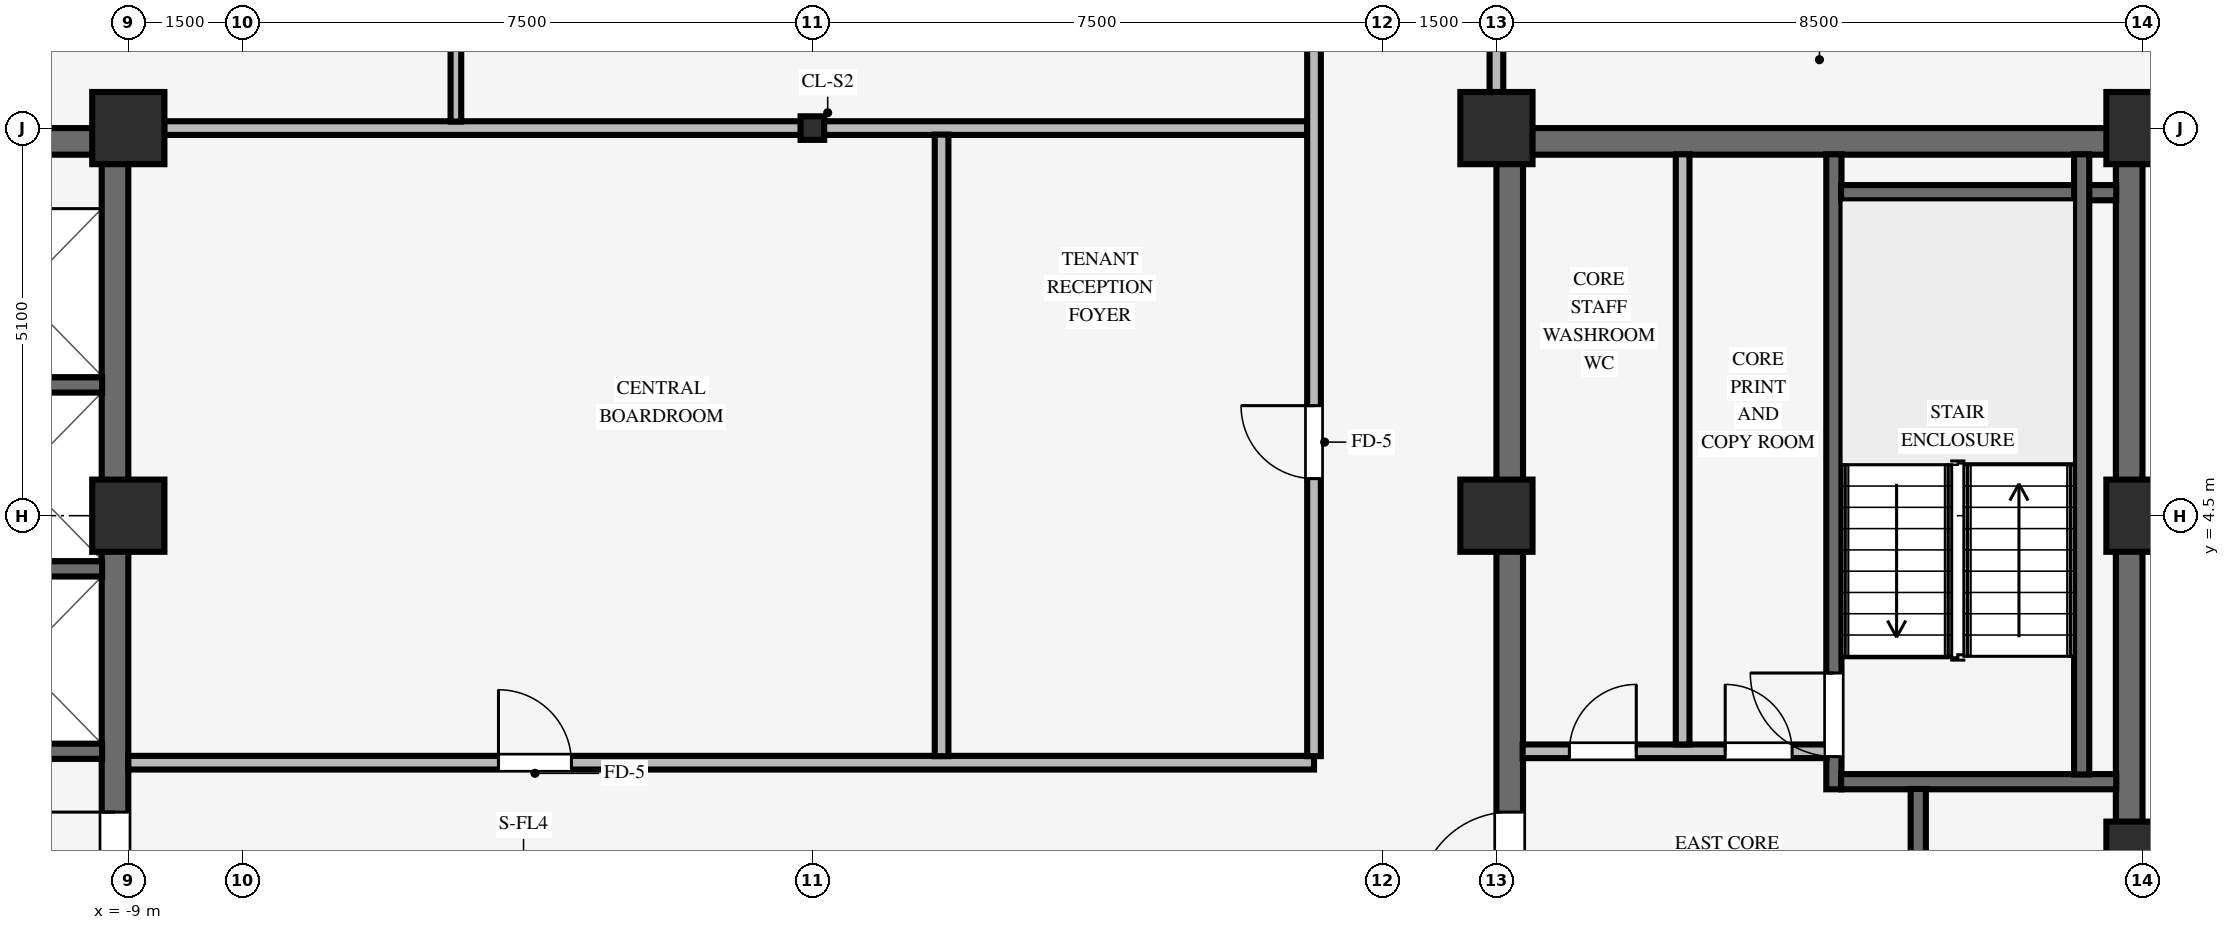
"""IFC4 building model, lengths in metres.
Left out: names, types, materials, properties, quantities, classifications, styles, units other than length and angle.
Written with IfcOpenShell. Run it as: python <this file> out.ifc"""

import sys

from ifc_helpers import new_model, si_unit, direction, frame, frame_2d, origin, origin_2d, place, context, subcontext, project, spatial, rectangle, i_section, extrude, source, transform, mapped, element, fill, save


model = new_model("IFC4")
c1 = context("Model", 3, precision=1e-05, world=origin(), true_north=direction((0.0, 1.0)))
c2 = subcontext(c1, "Body", "Model", "MODEL_VIEW")
j1 = project(units=[si_unit("LENGTHUNIT", "METRE"), si_unit("PLANEANGLEUNIT", "RADIAN")], contexts=[c1])
p1 = place(None, origin())
s1 = spatial("IfcSite", under=j1, at=p1, CompositionType="ELEMENT")
p2 = place(p1, origin())
s2 = spatial("IfcBuilding", under=s1, at=p2, CompositionType="ELEMENT")
p3 = place(p2, frame((0.0, 0.0, 212.8)))
s3 = spatial("IfcBuildingStorey", under=s2, at=p3, CompositionType="ELEMENT", Elevation=212.8)
p4 = place(p3, frame((-17.5, 9.425, 0.0), z_axis=(0.0, 0.0, 1.0), x_axis=(1.0, 0.0, 0.0)))
e1 = element("IfcWall", 1, at=p4, inside=s3, PredefinedType="SHEAR", context=c2, shape_type="SweptSolid", body=[
    extrude(rectangle(XDim=8.5, YDim=0.35, at=frame_2d((4.25, 0.0))), origin(), (0.0, 0.0, 1.0), 3.37),
])
p5 = place(p3, frame((-9.175, -9.255, 0.0), z_axis=(0.0, 0.0, 1.0), x_axis=(0.0, 1.0, 0.0)))
e2 = element("IfcWall", 2, at=p5, inside=s3, PredefinedType="SHEAR", context=c2, shape_type="SweptSolid", body=[
    extrude(rectangle(XDim=18.51, YDim=0.35, at=frame_2d((9.255, 0.0))), origin(), (0.0, 0.0, 1.0), 3.37),
])
p6 = place(p5, frame((8.655, 0.0, 0.0)))
e3 = element("IfcOpeningElement", 3, at=p6, cuts=e2, PredefinedType="OPENING", context=c2, shape_type="SweptSolid", body=[
    extrude(rectangle(XDim=1.2, YDim=2.15, at=frame_2d((0.6, 1.075))), frame((0.0, 0.185, 0.0), z_axis=(0.0, -1.0, 0.0), x_axis=(1.0, 0.0, 0.0)), (0.0, 0.0, 1.0), 0.37),
])
p7 = place(p3, frame((9.0, 9.425, 0.0), z_axis=(0.0, 0.0, 1.0), x_axis=(1.0, 0.0, 0.0)))
e4 = element("IfcWall", 4, at=p7, inside=s3, PredefinedType="SHEAR", context=c2, shape_type="SweptSolid", body=[
    extrude(rectangle(XDim=8.5, YDim=0.35, at=frame_2d((4.25, 0.0))), origin(), (0.0, 0.0, 1.0), 3.37),
])
p8 = place(p3, frame((9.175, -9.255, 0.0), z_axis=(0.0, 0.0, 1.0), x_axis=(0.0, 1.0, 0.0)))
e5 = element("IfcWall", 5, at=p8, inside=s3, PredefinedType="SHEAR", context=c2, shape_type="SweptSolid", body=[
    extrude(rectangle(XDim=18.51, YDim=0.35, at=frame_2d((9.255, 0.0))), origin(), (0.0, 0.0, 1.0), 3.37),
])
p9 = place(p8, frame((8.655, 0.0, 0.0)))
e6 = element("IfcOpeningElement", 6, at=p9, cuts=e5, PredefinedType="OPENING", context=c2, shape_type="SweptSolid", body=[
    extrude(rectangle(XDim=1.2, YDim=2.15, at=frame_2d((0.6, 1.075))), frame((0.0, 0.185, 0.0), z_axis=(0.0, -1.0, 0.0), x_axis=(1.0, 0.0, 0.0)), (0.0, 0.0, 1.0), 0.37),
])
p10 = place(p3, frame((17.325, -9.255, 0.0), z_axis=(0.0, 0.0, 1.0), x_axis=(0.0, 1.0, 0.0)))
e7 = element("IfcWall", 7, at=p10, inside=s3, PredefinedType="SHEAR", context=c2, shape_type="SweptSolid", body=[
    extrude(rectangle(XDim=18.51, YDim=0.35, at=frame_2d((9.255, 0.0))), origin(), (0.0, 0.0, 1.0), 3.37),
])
for number, where, z_axis, x_axis in (
    (8, (-9.0, 4.5, 0.0), (0.0, 0.0, 1.0), (1.0, 0.0, 0.0)),
    (9, (-9.0, 9.6, 0.0), (0.0, 0.0, 1.0), (1.0, 0.0, 0.0)),
    (10, (9.0, 4.5, 0.0), (0.0, 0.0, 1.0), (1.0, 0.0, 0.0)),
    (11, (9.0, 9.6, 0.0), (0.0, 0.0, 1.0), (1.0, 0.0, 0.0)),
    (12, (17.5, 4.5, 0.0), (0.0, 0.0, 1.0), (1.0, 0.0, 0.0)),
    (13, (17.5, 9.6, 0.0), (0.0, 0.0, 1.0), (1.0, 0.0, 0.0)),
    (14, (17.5, 0.0, 0.0), (0.0, 0.0, 1.0), (1.0, 0.0, 0.0)),
):
    element("IfcColumn", number, at=place(p3, frame(where, z_axis=z_axis, x_axis=x_axis)), inside=s3, PredefinedType="COLUMN", context=c2, shape_type="SweptSolid", body=[
        extrude(rectangle(XDim=0.95, YDim=0.95, at=origin_2d()), origin(), (0.0, 0.0, 1.0), 3.37),
    ])
p11 = place(p3, frame((0.0, 9.6, 0.0), z_axis=(0.0, 0.0, 1.0), x_axis=(1.0, 0.0, 0.0)))
e15 = element("IfcColumn", 15, at=p11, inside=s3, PredefinedType="COLUMN", context=c2, shape_type="SweptSolid", body=[
    extrude(i_section(OverallWidth=0.31, OverallDepth=0.31, WebThickness=0.015, FlangeThickness=0.015, FilletRadius=0.015, at=origin_2d()), origin(), (0.0, 0.0, 1.0), 3.37),
])
for number, where, z_axis, x_axis in (
    (16, (-11.505, 1.4, 0.0), (0.0, 0.0, 1.0), (1.0, 0.0, 0.0)),
    (17, (-11.505, 3.8, 0.0), (0.0, 0.0, 1.0), (1.0, 0.0, 0.0)),
    (18, (-11.505, 6.22, 0.0), (0.0, 0.0, 1.0), (1.0, 0.0, 0.0)),
):
    element("IfcWall", number, at=place(p3, frame(where, z_axis=z_axis, x_axis=x_axis)), inside=s3, PredefinedType="SHEAR", context=c2, shape_type="SweptSolid", body=[
        extrude(rectangle(XDim=2.16, YDim=0.2, at=frame_2d((1.08, 0.0))), origin(), (0.0, 0.0, 1.0), 3.37),
    ])
p12 = place(p3, frame((13.44, 0.9, 0.0), z_axis=(0.0, 0.0, 1.0), x_axis=(0.0, 1.0, 0.0)))
e19 = element("IfcWall", 19, at=p12, inside=s3, PredefinedType="SHEAR", context=c2, shape_type="SweptSolid", body=[
    extrude(rectangle(XDim=8.355, YDim=0.2, at=frame_2d((4.177, 0.0))), origin(), (0.0, 0.0, 1.0), 3.37),
])
p13 = place(p12, frame((0.43, 0.0, 0.0)))
e20 = element("IfcOpeningElement", 20, at=p13, cuts=e19, PredefinedType="OPENING", context=c2, shape_type="SweptSolid", body=[
    extrude(rectangle(XDim=1.1, YDim=2.15, at=frame_2d((0.55, 1.075))), frame((0.0, 0.11, 0.0), z_axis=(0.0, -1.0, 0.0), x_axis=(1.0, 0.0, 0.0)), (0.0, 0.0, 1.0), 0.22),
])
for number, where, z_axis, x_axis in (
    (21, (13.535, 1.0, 0.0), (0.0, 0.0, 1.0), (1.0, 0.0, 0.0)),
    (22, (13.535, 8.75, 0.0), (0.0, 0.0, 1.0), (1.0, 0.0, 0.0)),
):
    element("IfcWall", number, at=place(p3, frame(where, z_axis=z_axis, x_axis=x_axis)), inside=s3, PredefinedType="SHEAR", context=c2, shape_type="SweptSolid", body=[
        extrude(rectangle(XDim=3.62, YDim=0.2, at=frame_2d((1.81, 0.0))), origin(), (0.0, 0.0, 1.0), 3.37),
    ])
p14 = place(p3, frame((16.7, 1.095, 0.0), z_axis=(0.0, 0.0, 1.0), x_axis=(0.0, 1.0, 0.0)))
e23 = element("IfcWall", 23, at=p14, inside=s3, PredefinedType="SHEAR", context=c2, shape_type="SweptSolid", body=[
    extrude(rectangle(XDim=8.16, YDim=0.2, at=frame_2d((4.08, 0.0))), origin(), (0.0, 0.0, 1.0), 3.37),
])
p15 = place(p3, frame((14.55, -9.255, 0.0), z_axis=(0.0, 0.0, 1.0), x_axis=(0.0, 1.0, 0.0)))
e24 = element("IfcWall", 24, at=p15, inside=s3, PredefinedType="SHEAR", context=c2, shape_type="SweptSolid", body=[
    extrude(rectangle(XDim=10.16, YDim=0.2, at=frame_2d((5.08, 0.0))), origin(), (0.0, 0.0, 1.0), 3.37),
])
p16 = place(p15, frame((6.615, 0.0, 0.0)))
e25 = element("IfcOpeningElement", 25, at=p16, cuts=e24, PredefinedType="OPENING", context=c2, shape_type="SweptSolid", body=[
    extrude(rectangle(XDim=0.88, YDim=2.1, at=frame_2d((0.44, 1.05))), frame((0.0, 0.11, 0.0), z_axis=(0.0, -1.0, 0.0), x_axis=(1.0, 0.0, 0.0)), (0.0, 0.0, 1.0), 0.22),
])
p17 = place(p15, frame((0.98, 0.0, 0.0)))
e26 = element("IfcOpeningElement", 26, at=p17, cuts=e24, PredefinedType="OPENING", context=c2, shape_type="SweptSolid", body=[
    extrude(rectangle(XDim=1.15, YDim=2.15, at=frame_2d((0.575, 1.075))), frame((0.0, 0.11, 0.0), z_axis=(0.0, -1.0, 0.0), x_axis=(1.0, 0.0, 0.0)), (0.0, 0.0, 1.0), 0.22),
])
p18 = place(p3, frame((9.345, 1.4, 0.0), z_axis=(0.0, 0.0, 1.0), x_axis=(1.0, 0.0, 0.0)))
e27 = element("IfcWall", 27, at=p18, inside=s3, PredefinedType="PARTITIONING", context=c2, shape_type="SweptSolid", body=[
    extrude(rectangle(XDim=4.0, YDim=0.18, at=frame_2d((2.0, 0.0))), origin(), (0.0, 0.0, 1.0), 3.36),
])
p19 = place(p18, frame((0.615, 0.0, 0.0)))
e28 = element("IfcOpeningElement", 28, at=p19, cuts=e27, PredefinedType="OPENING", context=c2, shape_type="SweptSolid", body=[
    extrude(rectangle(XDim=0.88, YDim=2.1, at=frame_2d((0.44, 1.05))), frame((0.0, 0.1, 0.0), z_axis=(0.0, -1.0, 0.0), x_axis=(1.0, 0.0, 0.0)), (0.0, 0.0, 1.0), 0.2),
])
p20 = place(p18, frame((2.665, 0.0, 0.0)))
e29 = element("IfcOpeningElement", 29, at=p20, cuts=e27, PredefinedType="OPENING", context=c2, shape_type="SweptSolid", body=[
    extrude(rectangle(XDim=0.88, YDim=2.1, at=frame_2d((0.44, 1.05))), frame((0.0, 0.1, 0.0), z_axis=(0.0, -1.0, 0.0), x_axis=(1.0, 0.0, 0.0)), (0.0, 0.0, 1.0), 0.2),
])
p21 = place(p3, frame((11.45, 1.49, 0.0), z_axis=(0.0, 0.0, 1.0), x_axis=(0.0, 1.0, 0.0)))
e30 = element("IfcWall", 30, at=p21, inside=s3, PredefinedType="PARTITIONING", context=c2, shape_type="SweptSolid", body=[
    extrude(rectangle(XDim=7.765, YDim=0.18, at=frame_2d((3.882, 0.0))), origin(), (0.0, 0.0, 1.0), 3.36),
])
p22 = place(p3, frame((-9.0, 1.25, 0.0), z_axis=(0.0, 0.0, 1.0), x_axis=(1.0, 0.0, 0.0)))
e31 = element("IfcWall", 31, at=p22, inside=s3, PredefinedType="PARTITIONING", context=c2, shape_type="SweptSolid", body=[
    extrude(rectangle(XDim=15.6, YDim=0.18, at=frame_2d((7.8, 0.0))), origin(), (0.0, 0.0, 1.0), 3.36),
])
p23 = place(p22, frame((4.87, 0.0, 0.0)))
e32 = element("IfcOpeningElement", 32, at=p23, cuts=e31, PredefinedType="OPENING", context=c2, shape_type="SweptSolid", body=[
    extrude(rectangle(XDim=0.96, YDim=2.1, at=frame_2d((0.48, 1.05))), frame((0.0, 0.1, 0.0), z_axis=(0.0, -1.0, 0.0), x_axis=(1.0, 0.0, 0.0)), (0.0, 0.0, 1.0), 0.2),
])
p24 = place(p3, frame((-8.529, 9.6, 0.0), z_axis=(0.0, 0.0, 1.0), x_axis=(1.0, 0.0, 0.0)))
e33 = element("IfcWall", 33, at=p24, inside=s3, PredefinedType="PARTITIONING", context=c2, shape_type="SweptSolid", body=[
    extrude(rectangle(XDim=8.378, YDim=0.18, at=frame_2d((4.189, 0.0))), origin(), (0.0, 0.0, 1.0), 2.405),
])
p25 = place(p3, frame((0.151, 9.6, 0.0), z_axis=(0.0, 0.0, 1.0), x_axis=(1.0, 0.0, 0.0)))
e34 = element("IfcWall", 34, at=p25, inside=s3, PredefinedType="PARTITIONING", context=c2, shape_type="SweptSolid", body=[
    extrude(rectangle(XDim=6.363, YDim=0.18, at=frame_2d((3.182, 0.0))), origin(), (0.0, 0.0, 1.0), 2.405),
])
p26 = place(p3, frame((-4.69, 9.686, 0.0), z_axis=(0.0, 0.0, 1.0), x_axis=(0.0, 1.0, 0.0)))
e35 = element("IfcWall", 35, at=p26, inside=s3, PredefinedType="PARTITIONING", context=c2, shape_type="SweptSolid", body=[
    extrude(rectangle(XDim=3.728, YDim=0.14, at=frame_2d((1.864, 0.0))), origin(), (0.0, 0.0, 1.0), 3.36),
])
p27 = place(p3, frame((1.7, 1.336, 0.0), z_axis=(0.0, 0.0, 1.0), x_axis=(0.0, 1.0, 0.0)))
e36 = element("IfcWall", 36, at=p27, inside=s3, PredefinedType="PARTITIONING", context=c2, shape_type="SweptSolid", body=[
    extrude(rectangle(XDim=8.178, YDim=0.18, at=frame_2d((4.089, 0.0))), origin(), (0.0, 0.0, 1.0), 3.36),
])
p28 = place(p3, frame((6.6, 1.336, 0.0), z_axis=(0.0, 0.0, 1.0), x_axis=(0.0, 1.0, 0.0)))
e37 = element("IfcWall", 37, at=p28, inside=s3, PredefinedType="PARTITIONING", context=c2, shape_type="SweptSolid", body=[
    extrude(rectangle(XDim=12.078, YDim=0.18, at=frame_2d((6.039, 0.0))), origin(), (0.0, 0.0, 1.0), 3.36),
])
p29 = place(p28, frame((3.652, 0.0, 0.0)))
e38 = element("IfcOpeningElement", 38, at=p29, cuts=e37, PredefinedType="OPENING", context=c2, shape_type="SweptSolid", body=[
    extrude(rectangle(XDim=0.96, YDim=2.1, at=frame_2d((0.48, 1.05))), frame((0.0, 0.1, 0.0), z_axis=(0.0, -1.0, 0.0), x_axis=(1.0, 0.0, 0.0)), (0.0, 0.0, 1.0), 0.2),
])
p30 = place(p3, frame((9.0, 10.071, 0.0), z_axis=(0.0, 0.0, 1.0), x_axis=(0.0, 1.0, 0.0)))
e39 = element("IfcWall", 39, at=p30, inside=s3, PredefinedType="PARTITIONING", context=c2, shape_type="SweptSolid", body=[
    extrude(rectangle(XDim=5.743, YDim=0.18, at=frame_2d((2.872, 0.0))), origin(), (0.0, 0.0, 1.0), 2.816),
])
m1 = source(origin(), c2, "Body", "SweptSolid", [
    extrude(rectangle(XDim=1.1, YDim=2.15, at=frame_2d((0.55, 1.075))), frame((0.0, 0.025, 0.0), z_axis=(0.0, -1.0, 0.0), x_axis=(1.0, 0.0, 0.0)), (0.0, 0.0, 1.0), 0.05),
])
p31 = place(p13, origin())
e40 = element("IfcDoor", 40, at=p31, inside=s3, OperationType="SINGLE_SWING_RIGHT", PredefinedType="DOOR", context=c2, shape_type="MappedRepresentation", body=[
    mapped(m1, transform((0.0, 0.0, 0.0), scale=1.0)),
])
fill(e20, e40)
m2 = source(origin(), c2, "Body", "SweptSolid", [
    extrude(rectangle(XDim=1.2, YDim=2.15, at=frame_2d((0.6, 1.075))), frame((0.0, 0.025, 0.0), z_axis=(0.0, -1.0, 0.0), x_axis=(1.0, 0.0, 0.0)), (0.0, 0.0, 1.0), 0.05),
])
p32 = place(p6, origin())
e41 = element("IfcDoor", 41, at=p32, inside=s3, OperationType="SINGLE_SWING_RIGHT", PredefinedType="DOOR", context=c2, shape_type="MappedRepresentation", body=[
    mapped(m2, transform((0.0, 0.0, 0.0), scale=1.0)),
])
fill(e3, e41)
p33 = place(p9, origin())
e42 = element("IfcDoor", 42, at=p33, inside=s3, OperationType="SINGLE_SWING_LEFT", PredefinedType="DOOR", context=c2, shape_type="MappedRepresentation", body=[
    mapped(m2, transform((0.0, 0.0, 0.0), scale=1.0)),
])
fill(e6, e42)
m3 = source(origin(), c2, "Body", "SweptSolid", [
    extrude(rectangle(XDim=0.88, YDim=2.1, at=frame_2d((0.44, 1.05))), frame((0.0, 0.025, 0.0), z_axis=(0.0, -1.0, 0.0), x_axis=(1.0, 0.0, 0.0)), (0.0, 0.0, 1.0), 0.05),
])
p34 = place(p19, origin())
e43 = element("IfcDoor", 43, at=p34, inside=s3, OperationType="SINGLE_SWING_RIGHT", PredefinedType="DOOR", context=c2, shape_type="MappedRepresentation", body=[
    mapped(m3, transform((0.0, 0.0, 0.0), scale=1.0)),
])
fill(e28, e43)
p35 = place(p20, origin())
e44 = element("IfcDoor", 44, at=p35, inside=s3, OperationType="SINGLE_SWING_LEFT", PredefinedType="DOOR", context=c2, shape_type="MappedRepresentation", body=[
    mapped(m3, transform((0.0, 0.0, 0.0), scale=1.0)),
])
fill(e29, e44)
m4 = source(origin(), c2, "Body", "SweptSolid", [
    extrude(rectangle(XDim=0.96, YDim=2.1, at=frame_2d((0.48, 1.05))), frame((0.0, 0.025, 0.0), z_axis=(0.0, -1.0, 0.0), x_axis=(1.0, 0.0, 0.0)), (0.0, 0.0, 1.0), 0.05),
])
p36 = place(p23, origin())
e45 = element("IfcDoor", 45, at=p36, inside=s3, OperationType="SINGLE_SWING_LEFT", PredefinedType="DOOR", context=c2, shape_type="MappedRepresentation", body=[
    mapped(m4, transform((0.0, 0.0, 0.0), scale=1.0)),
])
fill(e32, e45)
p37 = place(p29, origin())
e46 = element("IfcDoor", 46, at=p37, inside=s3, OperationType="SINGLE_SWING_RIGHT", PredefinedType="DOOR", context=c2, shape_type="MappedRepresentation", body=[
    mapped(m4, transform((0.0, 0.0, 0.0), scale=1.0)),
])
fill(e38, e46)
save(model, sys.argv[1])
